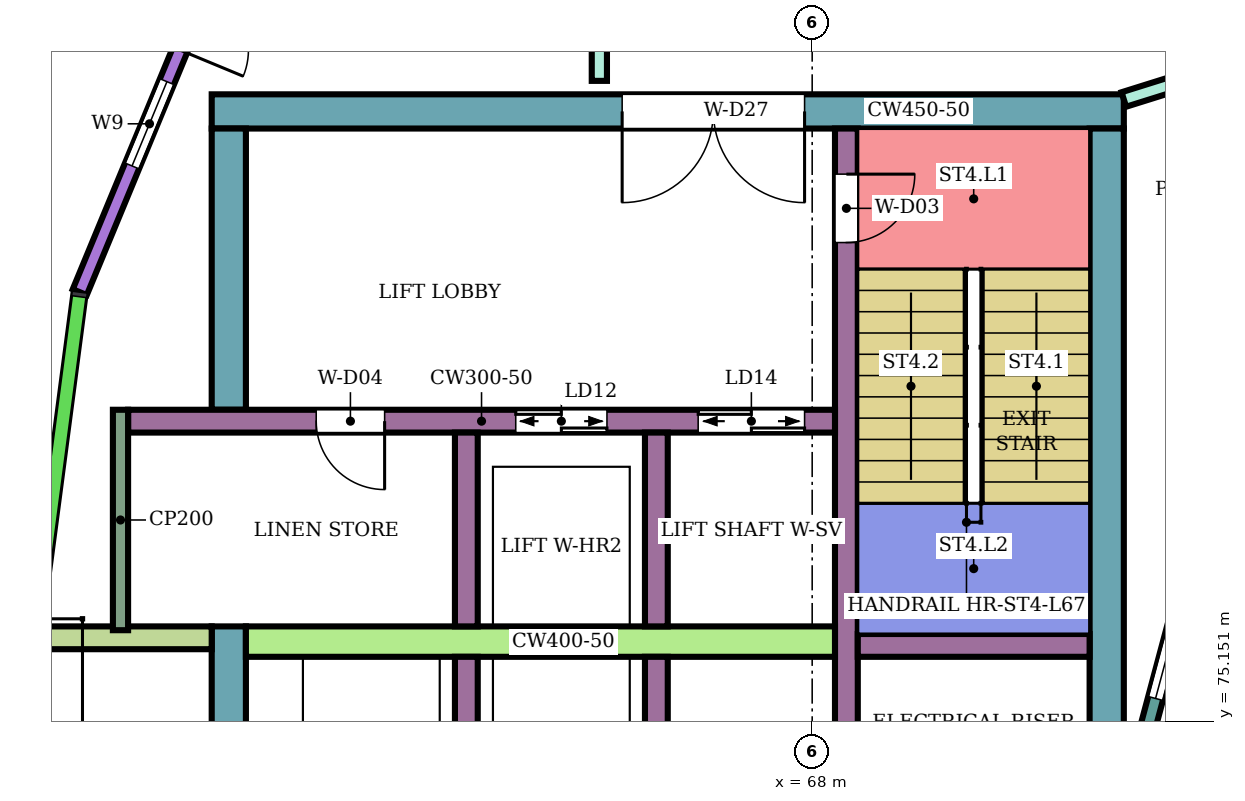
"""IFC4 building model, lengths in metres.
Left out: names, types, materials, properties, quantities, classifications, styles, units other than length and angle.
Written with IfcOpenShell. Run it as: python <this file> out.ifc"""

import sys

from ifc_helpers import new_model, si_unit, direction, frame, frame_2d, origin, place, context, subcontext, project, spatial, rectangle, extrude, element, fill, save


model = new_model("IFC4")
c1 = context("Model", 3, precision=1e-05, world=origin(), true_north=direction((0.0, 1.0)))
c2 = subcontext(c1, "Body", "Model", "MODEL_VIEW")
j1 = project(units=[si_unit("LENGTHUNIT", "METRE"), si_unit("PLANEANGLEUNIT", "RADIAN")], contexts=[c1])
p1 = place(None, origin())
s1 = spatial("IfcSite", under=j1, at=p1, CompositionType="ELEMENT")
p2 = place(p1, origin())
s2 = spatial("IfcBuilding", under=s1, at=p2, CompositionType="ELEMENT")
p3 = place(p2, frame((0.0, 0.0, 292.5)))
s3 = spatial("IfcBuildingStorey", under=s2, at=p3, CompositionType="ELEMENT", Elevation=292.5)
p4 = place(p3, frame((72.1, 83.175, 0.0), z_axis=(0.0, 0.0, 1.0), x_axis=(-1.0, 0.0, 0.0)))
e1 = element("IfcWall", 1, at=p4, inside=s3, PredefinedType="SHEAR", context=c2, shape_type="SweptSolid", body=[
    extrude(rectangle(XDim=12.0, YDim=0.45, at=frame_2d((6.0, 0.0))), origin(), (0.0, 0.0, 1.0), 3.88),
])
p5 = place(p4, frame((4.2, 0.0, 0.0)))
e2 = element("IfcOpeningElement", 2, at=p5, cuts=e1, PredefinedType="OPENING", context=c2, shape_type="SweptSolid", body=[
    extrude(rectangle(XDim=2.4, YDim=2.4, at=frame_2d((1.2, 1.2))), frame((0.0, 0.235, 0.0), z_axis=(0.0, -1.0, 0.0), x_axis=(1.0, 0.0, 0.0)), (0.0, 0.0, 1.0), 0.47),
])
p6 = place(p3, frame((71.875, 82.95, 0.0), z_axis=(0.0, 0.0, 1.0), x_axis=(0.0, -1.0, 0.0)))
e3 = element("IfcWall", 3, at=p6, inside=s3, PredefinedType="SHEAR", context=c2, shape_type="SweptSolid", body=[
    extrude(rectangle(XDim=7.95, YDim=0.45, at=frame_2d((3.975, 0.0))), origin(), (0.0, 0.0, 1.0), 3.88),
])
p7 = place(p3, frame((60.325, 76.4, 0.0), z_axis=(0.0, 0.0, 1.0), x_axis=(0.0, -1.0, 0.0)))
e4 = element("IfcWall", 4, at=p7, inside=s3, PredefinedType="SHEAR", context=c2, shape_type="SweptSolid", body=[
    extrude(rectangle(XDim=9.35, YDim=0.45, at=frame_2d((4.675, 0.0))), origin(), (0.0, 0.0, 1.0), 3.88),
])
p8 = place(p3, frame((60.325, 82.95, 0.0), z_axis=(0.0, 0.0, 1.0), x_axis=(0.0, -1.0, 0.0)))
e5 = element("IfcWall", 5, at=p8, inside=s3, PredefinedType="SHEAR", context=c2, shape_type="SweptSolid", body=[
    extrude(rectangle(XDim=3.7, YDim=0.45, at=frame_2d((1.85, 0.0))), origin(), (0.0, 0.0, 1.0), 3.88),
])
p9 = place(p3, frame((68.45, 82.95, 0.0), z_axis=(0.0, 0.0, 1.0), x_axis=(0.0, -1.0, 0.0)))
e6 = element("IfcWall", 6, at=p9, inside=s3, PredefinedType="SHEAR", context=c2, shape_type="SweptSolid", body=[
    extrude(rectangle(XDim=7.95, YDim=0.3, at=frame_2d((3.975, 0.0))), origin(), (0.0, 0.0, 1.0), 3.88),
])
p10 = place(p9, frame((0.6, 0.0, 0.0)))
e7 = element("IfcOpeningElement", 7, at=p10, cuts=e6, PredefinedType="OPENING", context=c2, shape_type="SweptSolid", body=[
    extrude(rectangle(XDim=0.9, YDim=2.1, at=frame_2d((0.45, 1.05))), frame((0.0, 0.16, 0.0), z_axis=(0.0, -1.0, 0.0), x_axis=(1.0, 0.0, 0.0)), (0.0, 0.0, 1.0), 0.32),
])
p11 = place(p3, frame((71.65, 76.15, 0.0), z_axis=(0.0, 0.0, 1.0), x_axis=(-1.0, 0.0, 0.0)))
e8 = element("IfcWall", 8, at=p11, inside=s3, PredefinedType="SHEAR", context=c2, shape_type="SweptSolid", body=[
    extrude(rectangle(XDim=3.05, YDim=0.3, at=frame_2d((1.525, 0.0))), origin(), (0.0, 0.0, 1.0), 3.88),
])
p12 = place(p3, frame((68.3, 76.2, 0.0), z_axis=(0.0, 0.0, 1.0), x_axis=(-1.0, 0.0, 0.0)))
e9 = element("IfcWall", 9, at=p12, inside=s3, PredefinedType="SHEAR", context=c2, shape_type="SweptSolid", body=[
    extrude(rectangle(XDim=7.75, YDim=0.4, at=frame_2d((3.875, 0.0))), origin(), (0.0, 0.0, 1.0), 3.88),
])
p13 = place(p3, frame((68.3, 79.1, 0.0), z_axis=(0.0, 0.0, 1.0), x_axis=(-1.0, 0.0, 0.0)))
e10 = element("IfcWall", 10, at=p13, inside=s3, PredefinedType="SHEAR", context=c2, shape_type="SweptSolid", body=[
    extrude(rectangle(XDim=9.3, YDim=0.3, at=frame_2d((4.65, 0.0))), origin(), (0.0, 0.0, 1.0), 3.88),
])
p14 = place(p13, frame((0.4, 0.0, 0.0)))
e11 = element("IfcOpeningElement", 11, at=p14, cuts=e10, PredefinedType="OPENING", context=c2, shape_type="SweptSolid", body=[
    extrude(rectangle(XDim=1.4, YDim=2.1, at=frame_2d((0.7, 1.05))), frame((0.0, 0.16, 0.0), z_axis=(0.0, -1.0, 0.0), x_axis=(1.0, 0.0, 0.0)), (0.0, 0.0, 1.0), 0.32),
])
p15 = place(p13, frame((3.0, 0.0, 0.0)))
e12 = element("IfcOpeningElement", 12, at=p15, cuts=e10, PredefinedType="OPENING", context=c2, shape_type="SweptSolid", body=[
    extrude(rectangle(XDim=1.2, YDim=2.1, at=frame_2d((0.6, 1.05))), frame((0.0, 0.16, 0.0), z_axis=(0.0, -1.0, 0.0), x_axis=(1.0, 0.0, 0.0)), (0.0, 0.0, 1.0), 0.32),
])
p16 = place(p13, frame((5.925, 0.0, 0.0)))
e13 = element("IfcOpeningElement", 13, at=p16, cuts=e10, PredefinedType="OPENING", context=c2, shape_type="SweptSolid", body=[
    extrude(rectangle(XDim=0.9, YDim=2.1, at=frame_2d((0.45, 1.05))), frame((0.0, 0.16, 0.0), z_axis=(0.0, -1.0, 0.0), x_axis=(1.0, 0.0, 0.0)), (0.0, 0.0, 1.0), 0.32),
])
for number, where, z_axis, x_axis in (
    (14, (65.95, 76.0, 0.0), (0.0, 0.0, 1.0), (0.0, -1.0, 0.0)),
    (15, (63.45, 76.0, 0.0), (0.0, 0.0, 1.0), (0.0, -1.0, 0.0)),
    (16, (65.95, 78.95, 0.0), (0.0, 0.0, 1.0), (0.0, -1.0, 0.0)),
    (17, (63.45, 78.95, 0.0), (0.0, 0.0, 1.0), (0.0, -1.0, 0.0)),
):
    element("IfcWall", number, at=place(p3, frame(where, z_axis=z_axis, x_axis=x_axis)), inside=s3, PredefinedType="SHEAR", context=c2, shape_type="SweptSolid", body=[
        extrude(rectangle(XDim=2.55, YDim=0.3, at=frame_2d((1.275, 0.0))), origin(), (0.0, 0.0, 1.0), 3.88),
    ])
p17 = place(p3, frame((60.602, 86.199, 0.0), z_axis=(0.0, 0.0, 1.0), x_axis=(-0.382708254591, -0.923869250418, 0.0)))
e18 = element("IfcWall", 18, at=p17, inside=s3, PredefinedType="NOTDEFINED", context=c2, shape_type="SweptSolid", body=[
    extrude(rectangle(XDim=5.847, YDim=0.2, at=frame_2d((2.924, 0.0))), origin(), (0.0, 0.0, 1.0), 4.2),
])
p18 = place(p17, frame((0.6, 0.0, 0.0)))
e19 = element("IfcOpeningElement", 19, at=p18, cuts=e18, PredefinedType="OPENING", context=c2, shape_type="SweptSolid", body=[
    extrude(rectangle(XDim=1.8, YDim=2.7, at=frame_2d((0.9, 1.35))), frame((0.0, 0.11, 0.0), z_axis=(0.0, -1.0, 0.0), x_axis=(1.0, 0.0, 0.0)), (0.0, 0.0, 1.0), 0.22),
])
p19 = place(p17, frame((2.85, 0.0, 0.9)))
e20 = element("IfcOpeningElement", 20, at=p19, cuts=e18, PredefinedType="OPENING", context=c2, shape_type="SweptSolid", body=[
    extrude(rectangle(XDim=1.2, YDim=2.7, at=frame_2d((0.6, 1.35))), frame((0.0, 0.11, 0.0), z_axis=(0.0, -1.0, 0.0), x_axis=(1.0, 0.0, 0.0)), (0.0, 0.0, 1.0), 0.22),
])
p20 = place(p3, frame((60.1, 76.25, 0.0), z_axis=(0.0, 0.0, 1.0), x_axis=(-1.0, 0.0, 0.0)))
e21 = element("IfcWall", 21, at=p20, inside=s3, PredefinedType="NOTDEFINED", context=c2, shape_type="SweptSolid", body=[
    extrude(rectangle(XDim=2.416, YDim=0.3, at=frame_2d((1.208, 0.0))), origin(), (0.0, 0.0, 1.0), 4.2),
])
p21 = place(p3, frame((73.415, 78.802, 0.0), z_axis=(0.0, 0.0, 1.0), x_axis=(-0.258789828301, -0.965933654434, 0.0)))
e22 = element("IfcWall", 22, at=p21, inside=s3, PredefinedType="NOTDEFINED", context=c2, shape_type="SweptSolid", body=[
    extrude(rectangle(XDim=3.936, YDim=0.2, at=frame_2d((1.968, 0.0))), origin(), (0.0, 0.0, 1.0), 4.2),
])
p22 = place(p21, frame((0.468, 0.0, 0.9)))
e23 = element("IfcOpeningElement", 23, at=p22, cuts=e22, PredefinedType="OPENING", context=c2, shape_type="SweptSolid", body=[
    extrude(rectangle(XDim=3.0, YDim=2.3, at=frame_2d((1.5, 1.15))), frame((0.0, 0.11, 0.0), z_axis=(0.0, -1.0, 0.0), x_axis=(1.0, 0.0, 0.0)), (0.0, 0.0, 1.0), 0.22),
])
p23 = place(p3, frame((65.2, 83.577, 0.0), z_axis=(0.0, 0.0, 1.0), x_axis=(0.0, 1.0, 0.0)))
e24 = element("IfcWall", 24, at=p23, inside=s3, PredefinedType="PARTITIONING", context=c2, shape_type="SweptSolid", body=[
    extrude(rectangle(XDim=1.223, YDim=0.2, at=frame_2d((0.612, 0.0))), origin(), (0.0, 0.0, 1.0), 3.75),
])
p24 = place(p3, frame((72.1, 83.332, 0.0), z_axis=(0.0, 0.0, 1.0), x_axis=(0.954233106619, 0.299063836383, 0.0)))
e25 = element("IfcWall", 25, at=p24, inside=s3, PredefinedType="PARTITIONING", context=c2, shape_type="SweptSolid", body=[
    extrude(rectangle(XDim=2.414, YDim=0.2, at=frame_2d((1.207, 0.0))), origin(), (0.0, 0.0, 1.0), 3.75),
])
p25 = place(p24, frame((0.762, 0.0, 0.0)))
e26 = element("IfcOpeningElement", 26, at=p25, cuts=e25, PredefinedType="OPENING", context=c2, shape_type="SweptSolid", body=[
    extrude(rectangle(XDim=0.9, YDim=2.1, at=frame_2d((0.45, 1.05))), frame((0.0, 0.11, 0.0), z_axis=(0.0, -1.0, 0.0), x_axis=(1.0, 0.0, 0.0)), (0.0, 0.0, 1.0), 0.22),
])
p26 = place(p3, frame((58.9, 79.25, 0.0), z_axis=(0.0, 0.0, 1.0), x_axis=(0.0, -1.0, 0.0)))
e27 = element("IfcWall", 27, at=p26, inside=s3, PredefinedType="PARTITIONING", context=c2, shape_type="SweptSolid", body=[
    extrude(rectangle(XDim=2.9, YDim=0.2, at=frame_2d((1.45, 0.0))), origin(), (0.0, 0.0, 1.0), 3.88),
])
p27 = place(p19, origin())
e28 = element("IfcWindow", 28, at=p27, inside=s3, PartitioningType="SINGLE_PANEL", PredefinedType="WINDOW", context=c2, shape_type="SweptSolid", body=[
    extrude(rectangle(XDim=1.2, YDim=2.7, at=frame_2d((0.6, 1.35))), frame((0.0, 0.03, 0.0), z_axis=(0.0, -1.0, 0.0), x_axis=(1.0, 0.0, 0.0)), (0.0, 0.0, 1.0), 0.06),
])
fill(e20, e28)
p28 = place(p22, origin())
e29 = element("IfcWindow", 29, at=p28, inside=s3, PartitioningType="SINGLE_PANEL", PredefinedType="WINDOW", context=c2, shape_type="SweptSolid", body=[
    extrude(rectangle(XDim=3.0, YDim=2.3, at=frame_2d((1.5, 1.15))), frame((0.0, 0.03, 0.0), z_axis=(0.0, -1.0, 0.0), x_axis=(1.0, 0.0, 0.0)), (0.0, 0.0, 1.0), 0.06),
])
fill(e23, e29)
p29 = place(p10, origin())
e30 = element("IfcDoor", 30, at=p29, inside=s3, OperationType="SINGLE_SWING_LEFT", PredefinedType="DOOR", context=c2, shape_type="SweptSolid", body=[
    extrude(rectangle(XDim=0.9, YDim=2.1, at=frame_2d((0.45, 1.05))), frame((0.0, 0.025, 0.0), z_axis=(0.0, -1.0, 0.0), x_axis=(1.0, 0.0, 0.0)), (0.0, 0.0, 1.0), 0.05),
])
fill(e7, e30)
p30 = place(p14, origin())
e31 = element("IfcDoor", 31, at=p30, inside=s3, OperationType="DOUBLE_DOOR_SLIDING", PredefinedType="DOOR", context=c2, shape_type="SweptSolid", body=[
    extrude(rectangle(XDim=1.4, YDim=2.1, at=frame_2d((0.7, 1.05))), frame((0.0, 0.025, 0.0), z_axis=(0.0, -1.0, 0.0), x_axis=(1.0, 0.0, 0.0)), (0.0, 0.0, 1.0), 0.05),
])
fill(e11, e31)
p31 = place(p15, origin())
e32 = element("IfcDoor", 32, at=p31, inside=s3, OperationType="DOUBLE_DOOR_SLIDING", PredefinedType="DOOR", context=c2, shape_type="SweptSolid", body=[
    extrude(rectangle(XDim=1.2, YDim=2.1, at=frame_2d((0.6, 1.05))), frame((0.0, 0.025, 0.0), z_axis=(0.0, -1.0, 0.0), x_axis=(1.0, 0.0, 0.0)), (0.0, 0.0, 1.0), 0.05),
])
fill(e12, e32)
p32 = place(p16, origin())
e33 = element("IfcDoor", 33, at=p32, inside=s3, OperationType="SINGLE_SWING_LEFT", PredefinedType="DOOR", context=c2, shape_type="SweptSolid", body=[
    extrude(rectangle(XDim=0.9, YDim=2.1, at=frame_2d((0.45, 1.05))), frame((0.0, 0.025, 0.0), z_axis=(0.0, -1.0, 0.0), x_axis=(1.0, 0.0, 0.0)), (0.0, 0.0, 1.0), 0.05),
])
fill(e13, e33)
p33 = place(p5, origin())
e34 = element("IfcDoor", 34, at=p33, inside=s3, OperationType="DOUBLE_DOOR_SINGLE_SWING", PredefinedType="DOOR", context=c2, shape_type="SweptSolid", body=[
    extrude(rectangle(XDim=2.4, YDim=2.4, at=frame_2d((1.2, 1.2))), frame((0.0, 0.025, 0.0), z_axis=(0.0, -1.0, 0.0), x_axis=(1.0, 0.0, 0.0)), (0.0, 0.0, 1.0), 0.05),
])
fill(e2, e34)
save(model, sys.argv[1])
